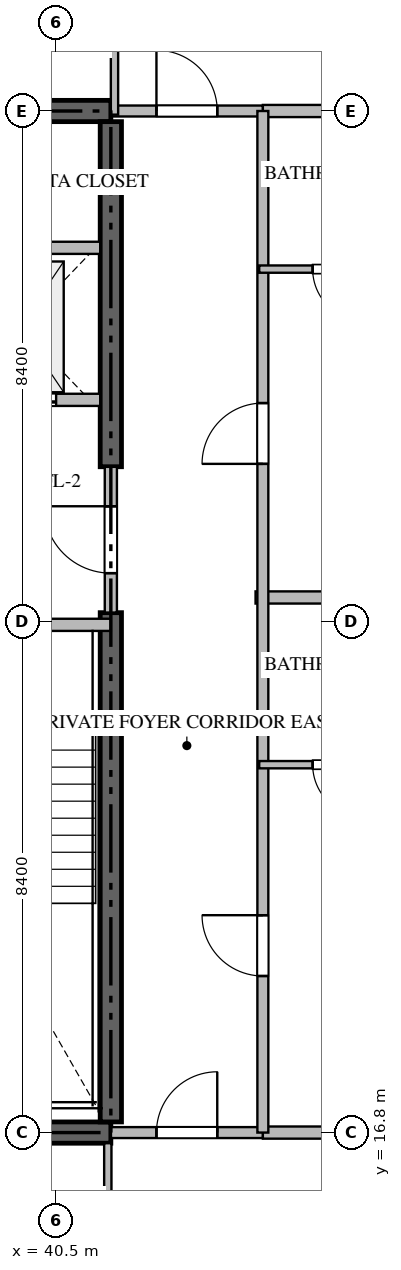
"""IFC4 building model, lengths in metres.
Left out: names, types, materials, properties, quantities, classifications, styles, units other than length and angle.
Written with IfcOpenShell. Run it as: python <this file> out.ifc"""

import sys

from ifc_helpers import new_model, si_unit, direction, frame, frame_2d, origin, place, context, subcontext, project, spatial, rectangle, extrude, source, transform, mapped, element, fill, save


model = new_model("IFC4")
c1 = context("Model", 3, precision=1e-05, world=origin(), true_north=direction((0.0, 1.0)))
c2 = subcontext(c1, "Body", "Model", "MODEL_VIEW")
j1 = project(units=[si_unit("LENGTHUNIT", "METRE"), si_unit("PLANEANGLEUNIT", "RADIAN")], contexts=[c1])
p1 = place(None, origin())
s1 = spatial("IfcSite", under=j1, at=p1, CompositionType="ELEMENT")
p2 = place(p1, origin())
s2 = spatial("IfcBuilding", under=s1, at=p2, CompositionType="ELEMENT")
p3 = place(p2, frame((0.0, 0.0, 329.9)))
s3 = spatial("IfcBuildingStorey", under=s2, at=p3, CompositionType="ELEMENT", Elevation=329.9)
for number, where, z_axis, x_axis in (
    (1, (23.4, 16.8, -0.26), (0.0, 0.0, 1.0), (1.0, 0.0, 0.0)),
    (2, (41.4, 33.6, -0.26), (0.0, 0.0, 1.0), (-1.0, 0.0, 0.0)),
):
    element("IfcWall", number, at=place(p3, frame(where, z_axis=z_axis, x_axis=x_axis)), inside=s3, PredefinedType="SHEAR", context=c2, shape_type="SweptSolid", body=[
        extrude(rectangle(XDim=18.0, YDim=0.35, at=frame_2d((9.0, 0.0))), origin(), (0.0, 0.0, 1.0), 4.048),
    ])
p4 = place(p3, frame((41.4, 16.975, -0.26), z_axis=(0.0, 0.0, 1.0), x_axis=(0.0, 1.0, 0.0)))
e3 = element("IfcWall", 3, at=p4, inside=s3, PredefinedType="SHEAR", context=c2, shape_type="SweptSolid", body=[
    extrude(rectangle(XDim=8.375, YDim=0.35, at=frame_2d((4.188, 0.0))), origin(), (0.0, 0.0, 1.0), 4.048),
])
p5 = place(p3, frame((41.4, 27.75, -0.26), z_axis=(0.0, 0.0, 1.0), x_axis=(0.0, 1.0, 0.0)))
e4 = element("IfcWall", 4, at=p5, inside=s3, PredefinedType="SHEAR", context=c2, shape_type="SweptSolid", body=[
    extrude(rectangle(XDim=5.675, YDim=0.35, at=frame_2d((2.837, 0.0))), origin(), (0.0, 0.0, 1.0), 4.048),
])
p6 = place(p3, frame((36.95, 25.15, 0.0), z_axis=(0.0, 0.0, 1.0), x_axis=(1.0, 0.0, 0.0)))
e5 = element("IfcWall", 5, at=p6, inside=s3, PredefinedType="STANDARD", context=c2, shape_type="SweptSolid", body=[
    extrude(rectangle(XDim=4.45, YDim=0.2, at=frame_2d((2.225, 0.0))), origin(), (0.0, 0.0, 1.0), 3.79),
])
p7 = place(p6, frame((1.65, 0.0, 0.0)))
e6 = element("IfcOpeningElement", 6, at=p7, cuts=e5, PredefinedType="OPENING", context=c2, shape_type="SweptSolid", body=[
    extrude(rectangle(XDim=1.1, YDim=2.15, at=frame_2d((0.55, 1.075))), frame((0.0, 0.11, 0.0), z_axis=(0.0, -1.0, 0.0), x_axis=(1.0, 0.0, 0.0)), (0.0, 0.0, 1.0), 0.22),
])
p8 = place(p3, frame((38.75, 28.85, 0.0), z_axis=(0.0, 0.0, 1.0), x_axis=(1.0, 0.0, 0.0)))
e7 = element("IfcWall", 7, at=p8, inside=s3, PredefinedType="STANDARD", context=c2, shape_type="SweptSolid", body=[
    extrude(rectangle(XDim=2.475, YDim=0.2, at=frame_2d((1.238, 0.0))), origin(), (0.0, 0.0, 1.0), 3.79),
])
p9 = place(p8, frame((0.55, 0.0, 0.0)))
e8 = element("IfcOpeningElement", 8, at=p9, cuts=e7, PredefinedType="OPENING", context=c2, shape_type="SweptSolid", body=[
    extrude(rectangle(XDim=1.2, YDim=2.2, at=frame_2d((0.6, 1.1))), frame((0.0, 0.11, 0.0), z_axis=(0.0, -1.0, 0.0), x_axis=(1.0, 0.0, 0.0)), (0.0, 0.0, 1.0), 0.22),
])
p10 = place(p3, frame((38.75, 31.35, 0.0), z_axis=(0.0, 0.0, 1.0), x_axis=(1.0, 0.0, 0.0)))
e9 = element("IfcWall", 9, at=p10, inside=s3, PredefinedType="STANDARD", context=c2, shape_type="SweptSolid", body=[
    extrude(rectangle(XDim=2.475, YDim=0.2, at=frame_2d((1.238, 0.0))), origin(), (0.0, 0.0, 1.0), 3.79),
])
p11 = place(p3, frame((41.4, 25.352, 0.0), z_axis=(0.0, 0.0, 1.0), x_axis=(0.0, 1.0, 0.0)))
e10 = element("IfcWall", 10, at=p11, inside=s3, PredefinedType="STANDARD", context=c2, shape_type="SweptSolid", body=[
    extrude(rectangle(XDim=2.396, YDim=0.2, at=frame_2d((1.198, 0.0))), origin(), (0.0, 0.0, 1.0), 3.79),
])
p12 = place(p11, frame((0.648, 0.0, 0.0)))
e11 = element("IfcOpeningElement", 11, at=p12, cuts=e10, PredefinedType="OPENING", context=c2, shape_type="SweptSolid", body=[
    extrude(rectangle(XDim=1.1, YDim=2.15, at=frame_2d((0.55, 1.075))), frame((0.0, 0.11, 0.0), z_axis=(0.0, -1.0, 0.0), x_axis=(1.0, 0.0, 0.0)), (0.0, 0.0, 1.0), 0.22),
])
p13 = place(p3, frame((43.78, 25.6, 0.0), z_axis=(0.0, 0.0, 1.0), x_axis=(1.0, 0.0, 0.0)))
e12 = element("IfcWall", 12, at=p13, inside=s3, PredefinedType="PARTITIONING", context=c2, shape_type="SweptSolid", body=[
    extrude(rectangle(XDim=11.738, YDim=0.2, at=frame_2d((5.869, 0.0))), origin(), (0.0, 0.0, 1.0), 3.79),
])
for number, where, z_axis, x_axis in (
    (13, (43.9, 16.8, 0.0), (0.0, 0.0, 1.0), (1.0, 0.0, 0.0)),
    (14, (43.9, 33.6, 0.0), (0.0, 0.0, 1.0), (1.0, 0.0, 0.0)),
):
    element("IfcWall", number, at=place(p3, frame(where, z_axis=z_axis, x_axis=x_axis)), inside=s3, PredefinedType="PARTITIONING", context=c2, shape_type="SweptSolid", body=[
        extrude(rectangle(XDim=11.618, YDim=0.2, at=frame_2d((5.809, 0.0))), origin(), (0.0, 0.0, 1.0), 3.79),
    ])
p14 = place(p3, frame((41.402, 16.8, 0.0), z_axis=(0.0, 0.0, 1.0), x_axis=(1.0, 0.0, 0.0)))
e15 = element("IfcWall", 15, at=p14, inside=s3, PredefinedType="PARTITIONING", context=c2, shape_type="SweptSolid", body=[
    extrude(rectangle(XDim=2.496, YDim=0.18, at=frame_2d((1.248, 0.0))), origin(), (0.0, 0.0, 1.0), 3.79),
])
p15 = place(p14, frame((0.748, 0.0, 0.0)))
e16 = element("IfcOpeningElement", 16, at=p15, cuts=e15, PredefinedType="OPENING", context=c2, shape_type="SweptSolid", body=[
    extrude(rectangle(XDim=1.0, YDim=2.15, at=frame_2d((0.5, 1.075))), frame((0.0, 0.1, 0.0), z_axis=(0.0, -1.0, 0.0), x_axis=(1.0, 0.0, 0.0)), (0.0, 0.0, 1.0), 0.2),
])
p16 = place(p3, frame((41.402, 33.6, 0.0), z_axis=(0.0, 0.0, 1.0), x_axis=(1.0, 0.0, 0.0)))
e17 = element("IfcWall", 17, at=p16, inside=s3, PredefinedType="PARTITIONING", context=c2, shape_type="SweptSolid", body=[
    extrude(rectangle(XDim=2.496, YDim=0.18, at=frame_2d((1.248, 0.0))), origin(), (0.0, 0.0, 1.0), 3.79),
])
p17 = place(p16, frame((0.748, 0.0, 0.0)))
e18 = element("IfcOpeningElement", 18, at=p17, cuts=e17, PredefinedType="OPENING", context=c2, shape_type="SweptSolid", body=[
    extrude(rectangle(XDim=1.0, YDim=2.15, at=frame_2d((0.5, 1.075))), frame((0.0, 0.1, 0.0), z_axis=(0.0, -1.0, 0.0), x_axis=(1.0, 0.0, 0.0)), (0.0, 0.0, 1.0), 0.2),
])
p18 = place(p3, frame((43.9, 16.8, 0.0), z_axis=(0.0, 0.0, 1.0), x_axis=(0.0, 1.0, 0.0)))
e19 = element("IfcWall", 19, at=p18, inside=s3, PredefinedType="PARTITIONING", context=c2, shape_type="SweptSolid", body=[
    extrude(rectangle(XDim=16.8, YDim=0.18, at=frame_2d((8.4, 0.0))), origin(), (0.0, 0.0, 1.0), 3.79),
])
p19 = place(p18, frame((2.575, 0.0, 0.0)))
e20 = element("IfcOpeningElement", 20, at=p19, cuts=e19, PredefinedType="OPENING", context=c2, shape_type="SweptSolid", body=[
    extrude(rectangle(XDim=1.0, YDim=2.15, at=frame_2d((0.5, 1.075))), frame((0.0, 0.1, 0.0), z_axis=(0.0, -1.0, 0.0), x_axis=(1.0, 0.0, 0.0)), (0.0, 0.0, 1.0), 0.2),
])
p20 = place(p18, frame((10.997, 0.0, 0.0)))
e21 = element("IfcOpeningElement", 21, at=p20, cuts=e19, PredefinedType="OPENING", context=c2, shape_type="SweptSolid", body=[
    extrude(rectangle(XDim=1.0, YDim=2.15, at=frame_2d((0.5, 1.075))), frame((0.0, 0.1, 0.0), z_axis=(0.0, -1.0, 0.0), x_axis=(1.0, 0.0, 0.0)), (0.0, 0.0, 1.0), 0.2),
])
p21 = place(p3, frame((41.35, 14.05, 0.0), z_axis=(0.0, 0.0, 1.0), x_axis=(0.0, 1.0, 0.0)))
e22 = element("IfcWall", 22, at=p21, inside=s3, PredefinedType="PARTITIONING", context=c2, shape_type="SweptSolid", body=[
    extrude(rectangle(XDim=2.575, YDim=0.12, at=frame_2d((1.288, 0.0))), origin(), (0.0, 0.0, 1.0), 3.79),
])
p22 = place(p3, frame((41.46, 36.35, 0.0), z_axis=(0.0, 0.0, 1.0), x_axis=(0.0, -1.0, 0.0)))
e23 = element("IfcWall", 23, at=p22, inside=s3, PredefinedType="PARTITIONING", context=c2, shape_type="SweptSolid", body=[
    extrude(rectangle(XDim=2.81, YDim=0.12, at=frame_2d((1.405, 0.0))), origin(), (0.0, 0.0, 1.0), 3.79),
])
p23 = place(p3, frame((46.448, 22.85, 0.0), z_axis=(0.0, 0.0, 1.0), x_axis=(-1.0, 0.0, 0.0)))
e24 = element("IfcWall", 24, at=p23, inside=s3, PredefinedType="PARTITIONING", context=c2, shape_type="SweptSolid", body=[
    extrude(rectangle(XDim=2.608, YDim=0.12, at=frame_2d((1.304, 0.0))), origin(), (0.0, 0.0, 1.0), 3.79),
])
p24 = place(p23, frame((0.879, 0.0, 0.0)))
e25 = element("IfcOpeningElement", 25, at=p24, cuts=e24, PredefinedType="OPENING", context=c2, shape_type="SweptSolid", body=[
    extrude(rectangle(XDim=0.85, YDim=2.1, at=frame_2d((0.425, 1.05))), frame((0.0, 0.07, 0.0), z_axis=(0.0, -1.0, 0.0), x_axis=(1.0, 0.0, 0.0)), (0.0, 0.0, 1.0), 0.14),
])
p25 = place(p3, frame((46.448, 31.0, 0.0), z_axis=(0.0, 0.0, 1.0), x_axis=(-1.0, 0.0, 0.0)))
e26 = element("IfcWall", 26, at=p25, inside=s3, PredefinedType="PARTITIONING", context=c2, shape_type="SweptSolid", body=[
    extrude(rectangle(XDim=2.608, YDim=0.12, at=frame_2d((1.304, 0.0))), origin(), (0.0, 0.0, 1.0), 3.79),
])
p26 = place(p25, frame((0.879, 0.0, 0.0)))
e27 = element("IfcOpeningElement", 27, at=p26, cuts=e26, PredefinedType="OPENING", context=c2, shape_type="SweptSolid", body=[
    extrude(rectangle(XDim=0.85, YDim=2.1, at=frame_2d((0.425, 1.05))), frame((0.0, 0.07, 0.0), z_axis=(0.0, -1.0, 0.0), x_axis=(1.0, 0.0, 0.0)), (0.0, 0.0, 1.0), 0.14),
])
m1 = source(origin(), c2, "Body", "SweptSolid", [
    extrude(rectangle(XDim=1.2, YDim=2.2, at=frame_2d((0.6, 1.1))), frame((0.0, 0.025, 0.0), z_axis=(0.0, -1.0, 0.0), x_axis=(1.0, 0.0, 0.0)), (0.0, 0.0, 1.0), 0.05),
])
p27 = place(p9, origin())
e28 = element("IfcDoor", 28, at=p27, inside=s3, OperationType="DOUBLE_DOOR_SLIDING", PredefinedType="DOOR", context=c2, shape_type="MappedRepresentation", body=[
    mapped(m1, transform((0.0, 0.0, 0.0), scale=1.0)),
])
fill(e8, e28)
m2 = source(origin(), c2, "Body", "SweptSolid", [
    extrude(rectangle(XDim=1.1, YDim=2.15, at=frame_2d((0.55, 1.075))), frame((0.0, 0.025, 0.0), z_axis=(0.0, -1.0, 0.0), x_axis=(1.0, 0.0, 0.0)), (0.0, 0.0, 1.0), 0.05),
])
p28 = place(p12, origin())
e29 = element("IfcDoor", 29, at=p28, inside=s3, OperationType="SINGLE_SWING_RIGHT", PredefinedType="DOOR", context=c2, shape_type="MappedRepresentation", body=[
    mapped(m2, transform((0.0, 0.0, 0.0), scale=1.0)),
])
fill(e11, e29)
m3 = source(origin(), c2, "Body", "SweptSolid", [
    extrude(rectangle(XDim=1.0, YDim=2.15, at=frame_2d((0.5, 1.075))), frame((0.0, 0.025, 0.0), z_axis=(0.0, -1.0, 0.0), x_axis=(1.0, 0.0, 0.0)), (0.0, 0.0, 1.0), 0.05),
])
p29 = place(p15, origin())
e30 = element("IfcDoor", 30, at=p29, inside=s3, OperationType="SINGLE_SWING_RIGHT", PredefinedType="DOOR", context=c2, shape_type="MappedRepresentation", body=[
    mapped(m3, transform((0.0, 0.0, 0.0), scale=1.0)),
])
fill(e16, e30)
p30 = place(p17, origin())
e31 = element("IfcDoor", 31, at=p30, inside=s3, OperationType="SINGLE_SWING_LEFT", PredefinedType="DOOR", context=c2, shape_type="MappedRepresentation", body=[
    mapped(m3, transform((0.0, 0.0, 0.0), scale=1.0)),
])
fill(e18, e31)
p31 = place(p19, origin())
e32 = element("IfcDoor", 32, at=p31, inside=s3, OperationType="SINGLE_SWING_RIGHT", PredefinedType="DOOR", context=c2, shape_type="MappedRepresentation", body=[
    mapped(m3, transform((0.0, 0.0, 0.0), scale=1.0)),
])
fill(e20, e32)
p32 = place(p20, origin())
e33 = element("IfcDoor", 33, at=p32, inside=s3, OperationType="SINGLE_SWING_LEFT", PredefinedType="DOOR", context=c2, shape_type="MappedRepresentation", body=[
    mapped(m3, transform((0.0, 0.0, 0.0), scale=1.0)),
])
fill(e21, e33)
m4 = source(origin(), c2, "Body", "SweptSolid", [
    extrude(rectangle(XDim=0.85, YDim=2.1, at=frame_2d((0.425, 1.05))), frame((0.0, 0.025, 0.0), z_axis=(0.0, -1.0, 0.0), x_axis=(1.0, 0.0, 0.0)), (0.0, 0.0, 1.0), 0.05),
])
p33 = place(p24, origin())
e34 = element("IfcDoor", 34, at=p33, inside=s3, OperationType="SINGLE_SWING_LEFT", PredefinedType="DOOR", context=c2, shape_type="MappedRepresentation", body=[
    mapped(m4, transform((0.0, 0.0, 0.0), scale=1.0)),
])
fill(e25, e34)
p34 = place(p26, origin())
e35 = element("IfcDoor", 35, at=p34, inside=s3, OperationType="SINGLE_SWING_LEFT", PredefinedType="DOOR", context=c2, shape_type="MappedRepresentation", body=[
    mapped(m4, transform((0.0, 0.0, 0.0), scale=1.0)),
])
fill(e27, e35)
save(model, sys.argv[1])
